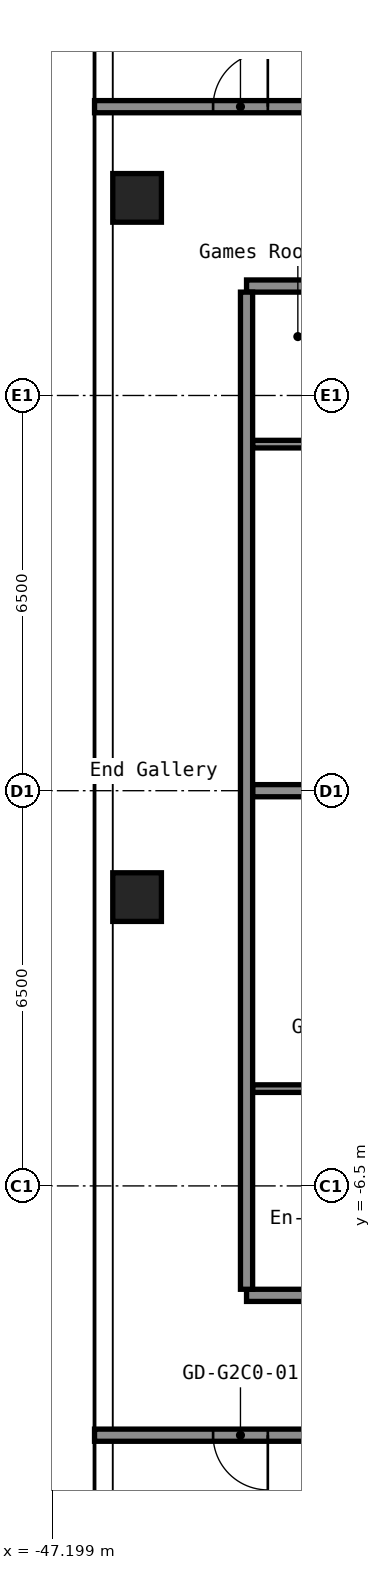
"""IFC4 building model, lengths in metres.
Left out: names, types, materials, properties, quantities, classifications, styles, units other than length and angle.
Written with IfcOpenShell. Run it as: python <this file> out.ifc"""

import sys

from ifc_helpers import new_model, si_unit, direction, frame, frame_2d, origin, origin_2d, place, context, subcontext, project, spatial, rectangle, hollow_rectangle, extrude, element, fill, save


model = new_model("IFC4")
c1 = context("Model", 3, precision=1e-05, world=origin(), true_north=direction((0.0, 1.0)))
c2 = subcontext(c1, "Body", "Model", "MODEL_VIEW")
j1 = project(units=[si_unit("LENGTHUNIT", "METRE"), si_unit("PLANEANGLEUNIT", "RADIAN")], contexts=[c1])
p1 = place(None, origin())
s1 = spatial("IfcSite", under=j1, at=p1, CompositionType="ELEMENT")
p2 = place(p1, origin())
s2 = spatial("IfcBuilding", under=s1, at=p2, CompositionType="ELEMENT")
p3 = place(p2, frame((0.0, 0.0, 81.8)))
s3 = spatial("IfcBuildingStorey", under=s2, at=p3, CompositionType="ELEMENT", Elevation=81.8)
for number, where, z_axis, x_axis in (
    (1, (-45.8, -1.75, 0.0), (0.0, 0.0, 1.0), (1.0, 0.0, 0.0)),
    (2, (-45.8, 9.75, 0.0), (0.0, 0.0, 1.0), (1.0, 0.0, 0.0)),
):
    element("IfcColumn", number, at=place(p3, frame(where, z_axis=z_axis, x_axis=x_axis)), inside=s3, PredefinedType="COLUMN", context=c2, shape_type="SweptSolid", body=[
        extrude(hollow_rectangle(XDim=0.8, YDim=0.8, WallThickness=0.032, at=origin_2d()), origin(), (0.0, 0.0, 1.0), 2.8),
    ])
p4 = place(p3, frame((-46.5, -10.6, 0.0), z_axis=(0.0, 0.0, 1.0), x_axis=(1.0, 0.0, 0.0)))
e3 = element("IfcWall", 3, at=p4, inside=s3, PredefinedType="PARTITIONING", context=c2, shape_type="SweptSolid", body=[
    extrude(rectangle(XDim=29.7, YDim=0.2, at=frame_2d((14.85, 0.0))), origin(), (0.0, 0.0, 1.0), 2.8),
])
p5 = place(p4, frame((1.95, 0.0, 0.0)))
e4 = element("IfcOpeningElement", 4, at=p5, cuts=e3, PredefinedType="OPENING", context=c2, shape_type="SweptSolid", body=[
    extrude(rectangle(XDim=0.9, YDim=2.1, at=frame_2d((0.45, 1.05))), frame((0.0, 0.11, 0.0), z_axis=(0.0, -1.0, 0.0), x_axis=(1.0, 0.0, 0.0)), (0.0, 0.0, 1.0), 0.22),
])
p6 = place(p4, frame((6.74, 0.0, 0.0)))
e5 = element("IfcOpeningElement", 5, at=p6, cuts=e3, PredefinedType="OPENING", context=c2, shape_type="SweptSolid", body=[
    extrude(rectangle(XDim=0.9, YDim=2.1, at=frame_2d((0.45, 1.05))), frame((0.0, 0.11, 0.0), z_axis=(0.0, -1.0, 0.0), x_axis=(1.0, 0.0, 0.0)), (0.0, 0.0, 1.0), 0.22),
])
p7 = place(p4, frame((10.94, 0.0, 0.0)))
e6 = element("IfcOpeningElement", 6, at=p7, cuts=e3, PredefinedType="OPENING", context=c2, shape_type="SweptSolid", body=[
    extrude(rectangle(XDim=0.9, YDim=2.1, at=frame_2d((0.45, 1.05))), frame((0.0, 0.11, 0.0), z_axis=(0.0, -1.0, 0.0), x_axis=(1.0, 0.0, 0.0)), (0.0, 0.0, 1.0), 0.22),
])
p8 = place(p4, frame((15.055, 0.0, 0.0)))
e7 = element("IfcOpeningElement", 7, at=p8, cuts=e3, PredefinedType="OPENING", context=c2, shape_type="SweptSolid", body=[
    extrude(rectangle(XDim=0.9, YDim=2.1, at=frame_2d((0.45, 1.05))), frame((0.0, 0.11, 0.0), z_axis=(0.0, -1.0, 0.0), x_axis=(1.0, 0.0, 0.0)), (0.0, 0.0, 1.0), 0.22),
])
p9 = place(p4, frame((19.255, 0.0, 0.0)))
e8 = element("IfcOpeningElement", 8, at=p9, cuts=e3, PredefinedType="OPENING", context=c2, shape_type="SweptSolid", body=[
    extrude(rectangle(XDim=0.9, YDim=2.1, at=frame_2d((0.45, 1.05))), frame((0.0, 0.11, 0.0), z_axis=(0.0, -1.0, 0.0), x_axis=(1.0, 0.0, 0.0)), (0.0, 0.0, 1.0), 0.22),
])
p10 = place(p4, frame((25.0, 0.0, 0.0)))
e9 = element("IfcOpeningElement", 9, at=p10, cuts=e3, PredefinedType="OPENING", context=c2, shape_type="SweptSolid", body=[
    extrude(rectangle(XDim=1.0, YDim=2.1, at=frame_2d((0.5, 1.05))), frame((0.0, 0.11, 0.0), z_axis=(0.0, -1.0, 0.0), x_axis=(1.0, 0.0, 0.0)), (0.0, 0.0, 1.0), 0.22),
])
p11 = place(p3, frame((-44.0, -8.3, 0.0), z_axis=(0.0, 0.0, 1.0), x_axis=(1.0, 0.0, 0.0)))
e10 = element("IfcWall", 10, at=p11, inside=s3, PredefinedType="PARTITIONING", context=c2, shape_type="SweptSolid", body=[
    extrude(rectangle(XDim=10.4, YDim=0.2, at=frame_2d((5.2, 0.0))), origin(), (0.0, 0.0, 1.0), 2.8),
])
p12 = place(p11, frame((6.35, 0.0, 0.0)))
e11 = element("IfcOpeningElement", 11, at=p12, cuts=e10, PredefinedType="OPENING", context=c2, shape_type="SweptSolid", body=[
    extrude(rectangle(XDim=1.0, YDim=2.1, at=frame_2d((0.5, 1.05))), frame((0.0, 0.11, 0.0), z_axis=(0.0, -1.0, 0.0), x_axis=(1.0, 0.0, 0.0)), (0.0, 0.0, 1.0), 0.22),
])
p13 = place(p3, frame((-43.9, -4.9, 0.0), z_axis=(0.0, 0.0, 1.0), x_axis=(1.0, 0.0, 0.0)))
e12 = element("IfcWall", 12, at=p13, inside=s3, PredefinedType="PARTITIONING", context=c2, shape_type="SweptSolid", body=[
    extrude(rectangle(XDim=3.237, YDim=0.125, at=frame_2d((1.619, 0.0))), origin(), (0.0, 0.0, 1.0), 2.8),
])
p14 = place(p13, frame((1.2, 0.0, 0.0)))
e13 = element("IfcOpeningElement", 13, at=p14, cuts=e12, PredefinedType="OPENING", context=c2, shape_type="SweptSolid", body=[
    extrude(rectangle(XDim=0.8, YDim=2.1, at=frame_2d((0.4, 1.05))), frame((0.0, 0.073, 0.0), z_axis=(0.0, -1.0, 0.0), x_axis=(1.0, 0.0, 0.0)), (0.0, 0.0, 1.0), 0.145),
])
p15 = place(p3, frame((-43.9, 0.0, 0.0), z_axis=(0.0, 0.0, 1.0), x_axis=(1.0, 0.0, 0.0)))
e14 = element("IfcWall", 14, at=p15, inside=s3, PredefinedType="PARTITIONING", context=c2, shape_type="SweptSolid", body=[
    extrude(rectangle(XDim=10.3, YDim=0.2, at=frame_2d((5.15, 0.0))), origin(), (0.0, 0.0, 1.0), 2.8),
])
p16 = place(p3, frame((-43.9, 5.7, 0.0), z_axis=(0.0, 0.0, 1.0), x_axis=(1.0, 0.0, 0.0)))
e15 = element("IfcWall", 15, at=p16, inside=s3, PredefinedType="PARTITIONING", context=c2, shape_type="SweptSolid", body=[
    extrude(rectangle(XDim=2.237, YDim=0.125, at=frame_2d((1.119, 0.0))), origin(), (0.0, 0.0, 1.0), 2.8),
])
p17 = place(p3, frame((-44.0, 8.3, 0.0), z_axis=(0.0, 0.0, 1.0), x_axis=(1.0, 0.0, 0.0)))
e16 = element("IfcWall", 16, at=p17, inside=s3, PredefinedType="PARTITIONING", context=c2, shape_type="SweptSolid", body=[
    extrude(rectangle(XDim=10.4, YDim=0.2, at=frame_2d((5.2, 0.0))), origin(), (0.0, 0.0, 1.0), 2.8),
])
p18 = place(p17, frame((4.2, 0.0, 0.0)))
e17 = element("IfcOpeningElement", 17, at=p18, cuts=e16, PredefinedType="OPENING", context=c2, shape_type="SweptSolid", body=[
    extrude(rectangle(XDim=1.6, YDim=2.1, at=frame_2d((0.8, 1.05))), frame((0.0, 0.11, 0.0), z_axis=(0.0, -1.0, 0.0), x_axis=(1.0, 0.0, 0.0)), (0.0, 0.0, 1.0), 0.22),
])
p19 = place(p3, frame((-46.5, 11.25, 0.0), z_axis=(0.0, 0.0, 1.0), x_axis=(1.0, 0.0, 0.0)))
e18 = element("IfcWall", 18, at=p19, inside=s3, PredefinedType="PARTITIONING", context=c2, shape_type="SweptSolid", body=[
    extrude(rectangle(XDim=29.7, YDim=0.2, at=frame_2d((14.85, 0.0))), origin(), (0.0, 0.0, 1.0), 2.8),
])
p20 = place(p19, frame((1.95, 0.0, 0.0)))
e19 = element("IfcOpeningElement", 19, at=p20, cuts=e18, PredefinedType="OPENING", context=c2, shape_type="SweptSolid", body=[
    extrude(rectangle(XDim=0.9, YDim=2.1, at=frame_2d((0.45, 1.05))), frame((0.0, 0.11, 0.0), z_axis=(0.0, -1.0, 0.0), x_axis=(1.0, 0.0, 0.0)), (0.0, 0.0, 1.0), 0.22),
])
p21 = place(p19, frame((7.35, 0.0, 0.0)))
e20 = element("IfcOpeningElement", 20, at=p21, cuts=e18, PredefinedType="OPENING", context=c2, shape_type="SweptSolid", body=[
    extrude(rectangle(XDim=1.0, YDim=2.1, at=frame_2d((0.5, 1.05))), frame((0.0, 0.11, 0.0), z_axis=(0.0, -1.0, 0.0), x_axis=(1.0, 0.0, 0.0)), (0.0, 0.0, 1.0), 0.22),
])
p22 = place(p19, frame((9.05, 0.0, 0.0)))
e21 = element("IfcOpeningElement", 21, at=p22, cuts=e18, PredefinedType="OPENING", context=c2, shape_type="SweptSolid", body=[
    extrude(rectangle(XDim=1.0, YDim=2.1, at=frame_2d((0.5, 1.05))), frame((0.0, 0.11, 0.0), z_axis=(0.0, -1.0, 0.0), x_axis=(1.0, 0.0, 0.0)), (0.0, 0.0, 1.0), 0.22),
])
p23 = place(p19, frame((18.4, 0.0, 0.0)))
e22 = element("IfcOpeningElement", 22, at=p23, cuts=e18, PredefinedType="OPENING", context=c2, shape_type="SweptSolid", body=[
    extrude(rectangle(XDim=1.0, YDim=2.1, at=frame_2d((0.5, 1.05))), frame((0.0, 0.11, 0.0), z_axis=(0.0, -1.0, 0.0), x_axis=(1.0, 0.0, 0.0)), (0.0, 0.0, 1.0), 0.22),
])
p24 = place(p19, frame((24.15, 0.0, 0.0)))
e23 = element("IfcOpeningElement", 23, at=p24, cuts=e18, PredefinedType="OPENING", context=c2, shape_type="SweptSolid", body=[
    extrude(rectangle(XDim=1.0, YDim=2.1, at=frame_2d((0.5, 1.05))), frame((0.0, 0.11, 0.0), z_axis=(0.0, -1.0, 0.0), x_axis=(1.0, 0.0, 0.0)), (0.0, 0.0, 1.0), 0.22),
])
p25 = place(p19, frame((25.85, 0.0, 0.0)))
e24 = element("IfcOpeningElement", 24, at=p25, cuts=e18, PredefinedType="OPENING", context=c2, shape_type="SweptSolid", body=[
    extrude(rectangle(XDim=1.0, YDim=2.1, at=frame_2d((0.5, 1.05))), frame((0.0, 0.11, 0.0), z_axis=(0.0, -1.0, 0.0), x_axis=(1.0, 0.0, 0.0)), (0.0, 0.0, 1.0), 0.22),
])
p26 = place(p3, frame((-44.0, -8.2, 0.0), z_axis=(0.0, 0.0, 1.0), x_axis=(0.0, 1.0, 0.0)))
e25 = element("IfcWall", 25, at=p26, inside=s3, PredefinedType="PARTITIONING", context=c2, shape_type="SweptSolid", body=[
    extrude(rectangle(XDim=16.4, YDim=0.2, at=frame_2d((8.2, 0.0))), origin(), (0.0, 0.0, 1.0), 2.8),
])
p27 = place(p5, origin())
e26 = element("IfcDoor", 26, at=p27, inside=s3, OperationType="SINGLE_SWING_RIGHT", PredefinedType="DOOR", context=c2, shape_type="SweptSolid", body=[
    extrude(rectangle(XDim=0.9, YDim=2.1, at=frame_2d((0.45, 1.05))), frame((0.0, 0.025, 0.0), z_axis=(0.0, -1.0, 0.0), x_axis=(1.0, 0.0, 0.0)), (0.0, 0.0, 1.0), 0.05),
])
fill(e4, e26)
p28 = place(p20, origin())
e27 = element("IfcDoor", 27, at=p28, inside=s3, OperationType="SINGLE_SWING_LEFT", PredefinedType="DOOR", context=c2, shape_type="SweptSolid", body=[
    extrude(rectangle(XDim=0.9, YDim=2.1, at=frame_2d((0.45, 1.05))), frame((0.0, 0.025, 0.0), z_axis=(0.0, -1.0, 0.0), x_axis=(1.0, 0.0, 0.0)), (0.0, 0.0, 1.0), 0.05),
])
fill(e19, e27)
save(model, sys.argv[1])
